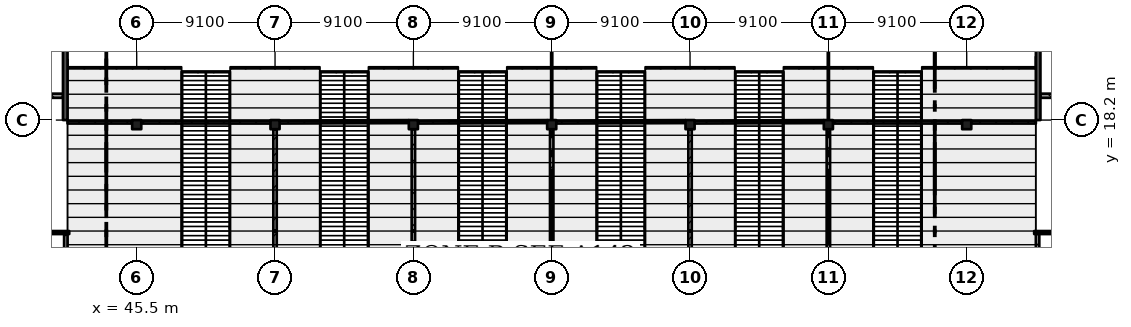
"""IFC4 building model, lengths in metres.
Left out: names, types, materials, properties, quantities, classifications, styles, units other than length and angle.
Written with IfcOpenShell. Run it as: python <this file> out.ifc"""

import sys

from ifc_helpers import new_model, si_unit, direction, frame, frame_2d, origin, origin_2d, place, context, subcontext, project, spatial, rectangle, extrude, element, fill, save


model = new_model("IFC4")
c1 = context("Model", 3, precision=1e-05, world=origin(), true_north=direction((0.0, 1.0)))
c2 = subcontext(c1, "Body", "Model", "MODEL_VIEW")
j1 = project(units=[si_unit("LENGTHUNIT", "METRE"), si_unit("PLANEANGLEUNIT", "RADIAN")], contexts=[c1])
p1 = place(None, origin())
s1 = spatial("IfcSite", under=j1, at=p1, CompositionType="ELEMENT")
p2 = place(p1, origin())
s2 = spatial("IfcBuilding", under=s1, at=p2, CompositionType="ELEMENT")
p3 = place(p2, frame((0.0, 0.0, 15.47)))
s3 = spatial("IfcBuildingStorey", under=s2, at=p3, CompositionType="ELEMENT", Elevation=15.47)
for number, where, z_axis, x_axis in (
    (1, (45.5, 17.9, 0.0), (0.0, 0.0, 1.0), (1.0, 0.0, 0.0)),
    (2, (54.6, 17.9, 0.0), (0.0, 0.0, 1.0), (1.0, 0.0, 0.0)),
    (3, (63.7, 17.9, 0.0), (0.0, 0.0, 1.0), (1.0, 0.0, 0.0)),
    (4, (72.8, 17.9, 0.0), (0.0, 0.0, 1.0), (1.0, 0.0, 0.0)),
    (5, (81.9, 17.9, 0.0), (0.0, 0.0, 1.0), (1.0, 0.0, 0.0)),
    (6, (91.0, 17.9, 0.0), (0.0, 0.0, 1.0), (1.0, 0.0, 0.0)),
    (7, (100.1, 17.9, 0.0), (0.0, 0.0, 1.0), (1.0, 0.0, 0.0)),
):
    element("IfcColumn", number, at=place(p3, frame(where, z_axis=z_axis, x_axis=x_axis)), inside=s3, PredefinedType="COLUMN", context=c2, shape_type="SweptSolid", body=[
        extrude(rectangle(XDim=0.6, YDim=0.6, at=origin_2d()), origin(), (0.0, 0.0, 1.0), 2.71),
    ])
for number, where, z_axis, x_axis in (
    (8, (40.8, 40.95, 0.0), (0.0, 0.0, 1.0), (0.0, -1.0, 0.0)),
    (9, (104.8, 40.95, 0.0), (0.0, 0.0, 1.0), (0.0, -1.0, 0.0)),
):
    element("IfcWall", number, at=place(p3, frame(where, z_axis=z_axis, x_axis=x_axis)), inside=s3, PredefinedType="SHEAR", context=c2, shape_type="SweptSolid", body=[
        extrude(rectangle(XDim=22.75, YDim=0.3, at=frame_2d((11.375, 0.0))), origin(), (0.0, 0.0, 1.0), 4.55),
    ])
p4 = place(p3, frame((36.3, 10.8, 0.0), z_axis=(0.0, 0.0, 1.0), x_axis=(1.0, 0.0, 0.0)))
e10 = element("IfcWall", 10, at=p4, inside=s3, PredefinedType="PARTITIONING", context=c2, shape_type="SweptSolid", body=[
    extrude(rectangle(XDim=4.762, YDim=0.2, at=frame_2d((2.381, 0.0))), origin(), (0.0, 0.0, 1.0), 4.3),
])
p5 = place(p4, frame((1.712, 0.0, 0.0)))
e11 = element("IfcOpeningElement", 11, at=p5, cuts=e10, PredefinedType="OPENING", context=c2, shape_type="SweptSolid", body=[
    extrude(rectangle(XDim=1.8, YDim=2.4, at=frame_2d((0.9, 1.2))), frame((0.0, 0.11, 0.0), z_axis=(0.0, -1.0, 0.0), x_axis=(1.0, 0.0, 0.0)), (0.0, 0.0, 1.0), 0.22),
])
p6 = place(p3, frame((36.962, 19.8, 0.0), z_axis=(0.0, 0.0, 1.0), x_axis=(1.0, 0.0, 0.0)))
e12 = element("IfcWall", 12, at=p6, inside=s3, PredefinedType="SOLIDWALL", context=c2, shape_type="SweptSolid", body=[
    extrude(rectangle(XDim=3.688, YDim=0.275, at=frame_2d((1.844, 0.0))), origin(), (0.0, 0.0, 1.0), 4.3),
])
p7 = place(p6, frame((1.25, 0.0, 0.0)))
e13 = element("IfcOpeningElement", 13, at=p7, cuts=e12, PredefinedType="OPENING", context=c2, shape_type="SweptSolid", body=[
    extrude(rectangle(XDim=1.2, YDim=2.4, at=frame_2d((0.6, 1.2))), frame((0.0, 0.147, 0.0), z_axis=(0.0, -1.0, 0.0), x_axis=(1.0, 0.0, 0.0)), (0.0, 0.0, 1.0), 0.295),
])
p8 = place(p3, frame((40.836, 10.7, 0.0), z_axis=(0.0, 0.0, 1.0), x_axis=(0.0, -1.0, 0.0)))
e14 = element("IfcWall", 14, at=p8, inside=s3, PredefinedType="PARTITIONING", context=c2, shape_type="SweptSolid", body=[
    extrude(rectangle(XDim=1.6, YDim=0.225, at=frame_2d((0.8, 0.0))), origin(), (0.0, 0.0, 1.0), 4.3),
])
p9 = place(p3, frame((54.6, 10.87, 0.0), z_axis=(0.0, 0.0, 1.0), x_axis=(0.0, -1.0, 0.0)))
e15 = element("IfcWall", 15, at=p9, inside=s3, PredefinedType="PARTITIONING", context=c2, shape_type="SweptSolid", body=[
    extrude(rectangle(XDim=1.77, YDim=0.225, at=frame_2d((0.885, 0.0))), origin(), (0.0, 0.0, 1.0), 3.22),
])
p10 = place(p3, frame((54.6, 17.6, 0.0), z_axis=(0.0, 0.0, 1.0), x_axis=(0.0, -1.0, 0.0)))
e16 = element("IfcWall", 16, at=p10, inside=s3, PredefinedType="PARTITIONING", context=c2, shape_type="SweptSolid", body=[
    extrude(rectangle(XDim=6.67, YDim=0.225, at=frame_2d((3.335, 0.0))), origin(), (0.0, 0.0, 1.0), 3.22),
])
p11 = place(p3, frame((63.7, 10.87, 0.0), z_axis=(0.0, 0.0, 1.0), x_axis=(0.0, -1.0, 0.0)))
e17 = element("IfcWall", 17, at=p11, inside=s3, PredefinedType="PARTITIONING", context=c2, shape_type="SweptSolid", body=[
    extrude(rectangle(XDim=1.77, YDim=0.225, at=frame_2d((0.885, 0.0))), origin(), (0.0, 0.0, 1.0), 3.22),
])
p12 = place(p3, frame((63.7, 17.6, 0.0), z_axis=(0.0, 0.0, 1.0), x_axis=(0.0, -1.0, 0.0)))
e18 = element("IfcWall", 18, at=p12, inside=s3, PredefinedType="PARTITIONING", context=c2, shape_type="SweptSolid", body=[
    extrude(rectangle(XDim=6.67, YDim=0.225, at=frame_2d((3.335, 0.0))), origin(), (0.0, 0.0, 1.0), 3.22),
])
p13 = place(p3, frame((72.8, 10.87, 0.0), z_axis=(0.0, 0.0, 1.0), x_axis=(0.0, -1.0, 0.0)))
e19 = element("IfcWall", 19, at=p13, inside=s3, PredefinedType="PARTITIONING", context=c2, shape_type="SweptSolid", body=[
    extrude(rectangle(XDim=1.77, YDim=0.225, at=frame_2d((0.885, 0.0))), origin(), (0.0, 0.0, 1.0), 3.22),
])
p14 = place(p3, frame((72.8, 17.6, 0.0), z_axis=(0.0, 0.0, 1.0), x_axis=(0.0, -1.0, 0.0)))
e20 = element("IfcWall", 20, at=p14, inside=s3, PredefinedType="PARTITIONING", context=c2, shape_type="SweptSolid", body=[
    extrude(rectangle(XDim=6.67, YDim=0.225, at=frame_2d((3.335, 0.0))), origin(), (0.0, 0.0, 1.0), 3.22),
])
p15 = place(p3, frame((81.9, 10.87, 0.0), z_axis=(0.0, 0.0, 1.0), x_axis=(0.0, -1.0, 0.0)))
e21 = element("IfcWall", 21, at=p15, inside=s3, PredefinedType="PARTITIONING", context=c2, shape_type="SweptSolid", body=[
    extrude(rectangle(XDim=1.77, YDim=0.225, at=frame_2d((0.885, 0.0))), origin(), (0.0, 0.0, 1.0), 3.22),
])
p16 = place(p3, frame((81.9, 17.6, 0.0), z_axis=(0.0, 0.0, 1.0), x_axis=(0.0, -1.0, 0.0)))
e22 = element("IfcWall", 22, at=p16, inside=s3, PredefinedType="PARTITIONING", context=c2, shape_type="SweptSolid", body=[
    extrude(rectangle(XDim=6.67, YDim=0.225, at=frame_2d((3.335, 0.0))), origin(), (0.0, 0.0, 1.0), 3.22),
])
p17 = place(p3, frame((91.0, 10.87, 0.0), z_axis=(0.0, 0.0, 1.0), x_axis=(0.0, -1.0, 0.0)))
e23 = element("IfcWall", 23, at=p17, inside=s3, PredefinedType="PARTITIONING", context=c2, shape_type="SweptSolid", body=[
    extrude(rectangle(XDim=1.77, YDim=0.225, at=frame_2d((0.885, 0.0))), origin(), (0.0, 0.0, 1.0), 3.22),
])
p18 = place(p3, frame((91.0, 17.6, 0.0), z_axis=(0.0, 0.0, 1.0), x_axis=(0.0, -1.0, 0.0)))
e24 = element("IfcWall", 24, at=p18, inside=s3, PredefinedType="PARTITIONING", context=c2, shape_type="SweptSolid", body=[
    extrude(rectangle(XDim=6.67, YDim=0.225, at=frame_2d((3.335, 0.0))), origin(), (0.0, 0.0, 1.0), 3.22),
])
p19 = place(p3, frame((104.763, 9.1, 0.0), z_axis=(0.0, 0.0, 1.0), x_axis=(0.0, 1.0, 0.0)))
e25 = element("IfcWall", 25, at=p19, inside=s3, PredefinedType="PARTITIONING", context=c2, shape_type="SweptSolid", body=[
    extrude(rectangle(XDim=1.6, YDim=0.225, at=frame_2d((0.8, 0.0))), origin(), (0.0, 0.0, 1.0), 4.3),
])
p20 = place(p3, frame((104.95, 19.8, 0.0), z_axis=(0.0, 0.0, 1.0), x_axis=(1.0, 0.0, 0.0)))
e26 = element("IfcWall", 26, at=p20, inside=s3, PredefinedType="SOLIDWALL", context=c2, shape_type="SweptSolid", body=[
    extrude(rectangle(XDim=3.688, YDim=0.275, at=frame_2d((1.844, 0.0))), origin(), (0.0, 0.0, 1.0), 4.3),
])
p21 = place(p20, frame((1.25, 0.0, 0.0)))
e27 = element("IfcOpeningElement", 27, at=p21, cuts=e26, PredefinedType="OPENING", context=c2, shape_type="SweptSolid", body=[
    extrude(rectangle(XDim=1.2, YDim=2.4, at=frame_2d((0.6, 1.2))), frame((0.0, 0.147, 0.0), z_axis=(0.0, -1.0, 0.0), x_axis=(1.0, 0.0, 0.0)), (0.0, 0.0, 1.0), 0.295),
])
p22 = place(p3, frame((104.538, 10.8, 0.0), z_axis=(0.0, 0.0, 1.0), x_axis=(1.0, 0.0, 0.0)))
e28 = element("IfcWall", 28, at=p22, inside=s3, PredefinedType="PARTITIONING", context=c2, shape_type="SweptSolid", body=[
    extrude(rectangle(XDim=4.762, YDim=0.2, at=frame_2d((2.381, 0.0))), origin(), (0.0, 0.0, 1.0), 4.3),
])
p23 = place(p22, frame((1.288, 0.0, 0.0)))
e29 = element("IfcOpeningElement", 29, at=p23, cuts=e28, PredefinedType="OPENING", context=c2, shape_type="SweptSolid", body=[
    extrude(rectangle(XDim=1.8, YDim=2.4, at=frame_2d((0.9, 1.2))), frame((0.0, 0.11, 0.0), z_axis=(0.0, -1.0, 0.0), x_axis=(1.0, 0.0, 0.0)), (0.0, 0.0, 1.0), 0.22),
])
p24 = place(p3, frame((40.95, 18.07, 0.0), z_axis=(0.0, 0.0, 1.0), x_axis=(1.0, 0.0, 0.0)))
e30 = element("IfcWall", 30, at=p24, inside=s3, PredefinedType="PARTITIONING", context=c2, shape_type="SweptSolid", body=[
    extrude(rectangle(XDim=4.25, YDim=0.2, at=frame_2d((2.125, 0.0))), origin(), (0.0, 0.0, 1.0), 2.91),
])
p25 = place(p24, frame((1.125, 0.0, 1.1)))
e31 = element("IfcOpeningElement", 31, at=p25, cuts=e30, PredefinedType="OPENING", context=c2, shape_type="SweptSolid", body=[
    extrude(rectangle(XDim=2.0, YDim=1.3, at=frame_2d((1.0, 0.65))), frame((0.0, 0.11, 0.0), z_axis=(0.0, -1.0, 0.0), x_axis=(1.0, 0.0, 0.0)), (0.0, 0.0, 1.0), 0.22),
])
p26 = place(p3, frame((45.8, 18.07, 0.0), z_axis=(0.0, 0.0, 1.0), x_axis=(1.0, 0.0, 0.0)))
e32 = element("IfcWall", 32, at=p26, inside=s3, PredefinedType="PARTITIONING", context=c2, shape_type="SweptSolid", body=[
    extrude(rectangle(XDim=8.5, YDim=0.2, at=frame_2d((4.25, 0.0))), origin(), (0.0, 0.0, 1.0), 2.71),
])
p27 = place(p26, frame((1.25, 0.0, 1.1)))
e33 = element("IfcOpeningElement", 33, at=p27, cuts=e32, PredefinedType="OPENING", context=c2, shape_type="SweptSolid", body=[
    extrude(rectangle(XDim=6.0, YDim=1.3, at=frame_2d((3.0, 0.65))), frame((0.0, 0.11, 0.0), z_axis=(0.0, -1.0, 0.0), x_axis=(1.0, 0.0, 0.0)), (0.0, 0.0, 1.0), 0.22),
])
p28 = place(p3, frame((54.9, 18.071, 0.0), z_axis=(0.0, 0.0, 1.0), x_axis=(0.999994544879, 0.003303061025, 0.0)))
e34 = element("IfcWall", 34, at=p28, inside=s3, PredefinedType="PARTITIONING", context=c2, shape_type="SweptSolid", body=[
    extrude(rectangle(XDim=8.5, YDim=0.2, at=frame_2d((4.25, 0.0))), origin(), (0.0, 0.0, 1.0), 2.71),
])
p29 = place(p28, frame((1.25, 0.0, 1.1)))
e35 = element("IfcOpeningElement", 35, at=p29, cuts=e34, PredefinedType="OPENING", context=c2, shape_type="SweptSolid", body=[
    extrude(rectangle(XDim=6.0, YDim=1.3, at=frame_2d((3.0, 0.65))), frame((0.0, 0.11, 0.0), z_axis=(0.0, -1.0, 0.0), x_axis=(1.0, 0.0, 0.0)), (0.0, 0.0, 1.0), 0.22),
])
p30 = place(p3, frame((64.0, 18.071, 0.0), z_axis=(0.0, 0.0, 1.0), x_axis=(0.999994544879, 0.003303061025, 0.0)))
e36 = element("IfcWall", 36, at=p30, inside=s3, PredefinedType="PARTITIONING", context=c2, shape_type="SweptSolid", body=[
    extrude(rectangle(XDim=8.5, YDim=0.2, at=frame_2d((4.25, 0.0))), origin(), (0.0, 0.0, 1.0), 2.71),
])
p31 = place(p30, frame((1.25, 0.0, 1.1)))
e37 = element("IfcOpeningElement", 37, at=p31, cuts=e36, PredefinedType="OPENING", context=c2, shape_type="SweptSolid", body=[
    extrude(rectangle(XDim=6.0, YDim=1.3, at=frame_2d((3.0, 0.65))), frame((0.0, 0.11, 0.0), z_axis=(0.0, -1.0, 0.0), x_axis=(1.0, 0.0, 0.0)), (0.0, 0.0, 1.0), 0.22),
])
p32 = place(p3, frame((73.1, 18.071, 0.0), z_axis=(0.0, 0.0, 1.0), x_axis=(0.999994544879, 0.003303061025, 0.0)))
e38 = element("IfcWall", 38, at=p32, inside=s3, PredefinedType="PARTITIONING", context=c2, shape_type="SweptSolid", body=[
    extrude(rectangle(XDim=8.5, YDim=0.2, at=frame_2d((4.25, 0.0))), origin(), (0.0, 0.0, 1.0), 2.71),
])
p33 = place(p32, frame((1.25, 0.0, 1.1)))
e39 = element("IfcOpeningElement", 39, at=p33, cuts=e38, PredefinedType="OPENING", context=c2, shape_type="SweptSolid", body=[
    extrude(rectangle(XDim=6.0, YDim=1.3, at=frame_2d((3.0, 0.65))), frame((0.0, 0.11, 0.0), z_axis=(0.0, -1.0, 0.0), x_axis=(1.0, 0.0, 0.0)), (0.0, 0.0, 1.0), 0.22),
])
p34 = place(p3, frame((82.2, 18.071, 0.0), z_axis=(0.0, 0.0, 1.0), x_axis=(0.999994544879, 0.003303061025, 0.0)))
e40 = element("IfcWall", 40, at=p34, inside=s3, PredefinedType="PARTITIONING", context=c2, shape_type="SweptSolid", body=[
    extrude(rectangle(XDim=8.5, YDim=0.2, at=frame_2d((4.25, 0.0))), origin(), (0.0, 0.0, 1.0), 2.71),
])
p35 = place(p34, frame((1.25, 0.0, 1.1)))
e41 = element("IfcOpeningElement", 41, at=p35, cuts=e40, PredefinedType="OPENING", context=c2, shape_type="SweptSolid", body=[
    extrude(rectangle(XDim=6.0, YDim=1.3, at=frame_2d((3.0, 0.65))), frame((0.0, 0.11, 0.0), z_axis=(0.0, -1.0, 0.0), x_axis=(1.0, 0.0, 0.0)), (0.0, 0.0, 1.0), 0.22),
])
p36 = place(p3, frame((91.3, 18.07, 0.0), z_axis=(0.0, 0.0, 1.0), x_axis=(1.0, 0.0, 0.0)))
e42 = element("IfcWall", 42, at=p36, inside=s3, PredefinedType="PARTITIONING", context=c2, shape_type="SweptSolid", body=[
    extrude(rectangle(XDim=8.5, YDim=0.2, at=frame_2d((4.25, 0.0))), origin(), (0.0, 0.0, 1.0), 2.71),
])
p37 = place(p36, frame((1.25, 0.0, 1.1)))
e43 = element("IfcOpeningElement", 43, at=p37, cuts=e42, PredefinedType="OPENING", context=c2, shape_type="SweptSolid", body=[
    extrude(rectangle(XDim=6.0, YDim=1.3, at=frame_2d((3.0, 0.65))), frame((0.0, 0.11, 0.0), z_axis=(0.0, -1.0, 0.0), x_axis=(1.0, 0.0, 0.0)), (0.0, 0.0, 1.0), 0.22),
])
p38 = place(p3, frame((100.4, 18.07, 0.0), z_axis=(0.0, 0.0, 1.0), x_axis=(1.0, 0.0, 0.0)))
e44 = element("IfcWall", 44, at=p38, inside=s3, PredefinedType="PARTITIONING", context=c2, shape_type="SweptSolid", body=[
    extrude(rectangle(XDim=4.25, YDim=0.2, at=frame_2d((2.125, 0.0))), origin(), (0.0, 0.0, 1.0), 2.91),
])
p39 = place(p38, frame((1.125, 0.0, 1.1)))
e45 = element("IfcOpeningElement", 45, at=p39, cuts=e44, PredefinedType="OPENING", context=c2, shape_type="SweptSolid", body=[
    extrude(rectangle(XDim=2.0, YDim=1.3, at=frame_2d((1.0, 0.65))), frame((0.0, 0.11, 0.0), z_axis=(0.0, -1.0, 0.0), x_axis=(1.0, 0.0, 0.0)), (0.0, 0.0, 1.0), 0.22),
])
p40 = place(p25, origin())
e46 = element("IfcWindow", 46, at=p40, inside=s3, PartitioningType="SINGLE_PANEL", PredefinedType="WINDOW", context=c2, shape_type="SweptSolid", body=[
    extrude(rectangle(XDim=2.0, YDim=1.3, at=frame_2d((1.0, 0.65))), frame((0.0, 0.03, 0.0), z_axis=(0.0, -1.0, 0.0), x_axis=(1.0, 0.0, 0.0)), (0.0, 0.0, 1.0), 0.06),
])
fill(e31, e46)
p41 = place(p27, origin())
e47 = element("IfcWindow", 47, at=p41, inside=s3, PartitioningType="SINGLE_PANEL", PredefinedType="WINDOW", context=c2, shape_type="SweptSolid", body=[
    extrude(rectangle(XDim=6.0, YDim=1.3, at=frame_2d((3.0, 0.65))), frame((0.0, 0.03, 0.0), z_axis=(0.0, -1.0, 0.0), x_axis=(1.0, 0.0, 0.0)), (0.0, 0.0, 1.0), 0.06),
])
fill(e33, e47)
p42 = place(p29, origin())
e48 = element("IfcWindow", 48, at=p42, inside=s3, PartitioningType="SINGLE_PANEL", PredefinedType="WINDOW", context=c2, shape_type="SweptSolid", body=[
    extrude(rectangle(XDim=6.0, YDim=1.3, at=frame_2d((3.0, 0.65))), frame((0.0, 0.03, 0.0), z_axis=(0.0, -1.0, 0.0), x_axis=(1.0, 0.0, 0.0)), (0.0, 0.0, 1.0), 0.06),
])
fill(e35, e48)
p43 = place(p31, origin())
e49 = element("IfcWindow", 49, at=p43, inside=s3, PartitioningType="SINGLE_PANEL", PredefinedType="WINDOW", context=c2, shape_type="SweptSolid", body=[
    extrude(rectangle(XDim=6.0, YDim=1.3, at=frame_2d((3.0, 0.65))), frame((0.0, 0.03, 0.0), z_axis=(0.0, -1.0, 0.0), x_axis=(1.0, 0.0, 0.0)), (0.0, 0.0, 1.0), 0.06),
])
fill(e37, e49)
p44 = place(p33, origin())
e50 = element("IfcWindow", 50, at=p44, inside=s3, PartitioningType="SINGLE_PANEL", PredefinedType="WINDOW", context=c2, shape_type="SweptSolid", body=[
    extrude(rectangle(XDim=6.0, YDim=1.3, at=frame_2d((3.0, 0.65))), frame((0.0, 0.03, 0.0), z_axis=(0.0, -1.0, 0.0), x_axis=(1.0, 0.0, 0.0)), (0.0, 0.0, 1.0), 0.06),
])
fill(e39, e50)
p45 = place(p35, origin())
e51 = element("IfcWindow", 51, at=p45, inside=s3, PartitioningType="SINGLE_PANEL", PredefinedType="WINDOW", context=c2, shape_type="SweptSolid", body=[
    extrude(rectangle(XDim=6.0, YDim=1.3, at=frame_2d((3.0, 0.65))), frame((0.0, 0.03, 0.0), z_axis=(0.0, -1.0, 0.0), x_axis=(1.0, 0.0, 0.0)), (0.0, 0.0, 1.0), 0.06),
])
fill(e41, e51)
p46 = place(p37, origin())
e52 = element("IfcWindow", 52, at=p46, inside=s3, PartitioningType="SINGLE_PANEL", PredefinedType="WINDOW", context=c2, shape_type="SweptSolid", body=[
    extrude(rectangle(XDim=6.0, YDim=1.3, at=frame_2d((3.0, 0.65))), frame((0.0, 0.03, 0.0), z_axis=(0.0, -1.0, 0.0), x_axis=(1.0, 0.0, 0.0)), (0.0, 0.0, 1.0), 0.06),
])
fill(e43, e52)
p47 = place(p39, origin())
e53 = element("IfcWindow", 53, at=p47, inside=s3, PartitioningType="SINGLE_PANEL", PredefinedType="WINDOW", context=c2, shape_type="SweptSolid", body=[
    extrude(rectangle(XDim=2.0, YDim=1.3, at=frame_2d((1.0, 0.65))), frame((0.0, 0.03, 0.0), z_axis=(0.0, -1.0, 0.0), x_axis=(1.0, 0.0, 0.0)), (0.0, 0.0, 1.0), 0.06),
])
fill(e45, e53)
save(model, sys.argv[1])
